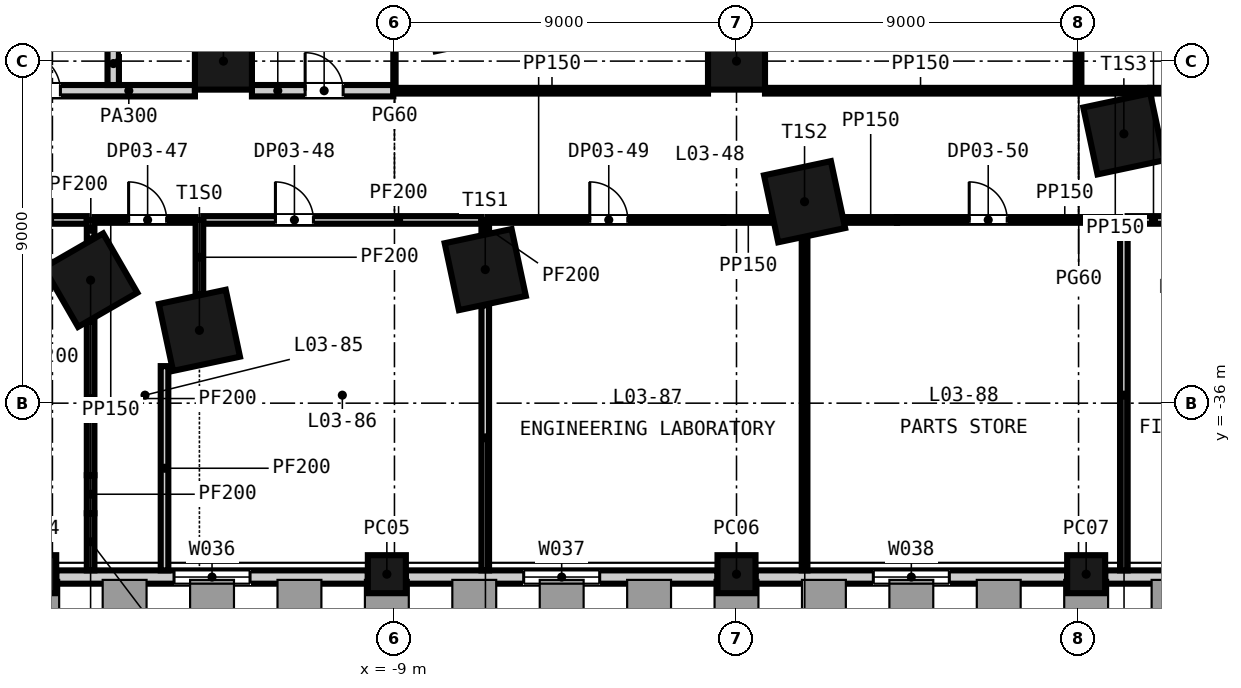
"""IFC4 building model, lengths in metres.
Left out: names, types, materials, properties, quantities, classifications, styles, units other than length and angle.
Written with IfcOpenShell. Run it as: python <this file> out.ifc"""

import sys

from ifc_helpers import new_model, si_unit, direction, frame, frame_2d, origin, origin_2d, place, context, subcontext, project, spatial, rectangle, extrude, element, fill, save


model = new_model("IFC4")
c1 = context("Model", 3, precision=1e-05, world=origin(), true_north=direction((0.0, 1.0)))
c2 = subcontext(c1, "Body", "Model", "MODEL_VIEW")
j1 = project(units=[si_unit("LENGTHUNIT", "METRE"), si_unit("PLANEANGLEUNIT", "RADIAN")], contexts=[c1])
p1 = place(None, origin())
s1 = spatial("IfcSite", under=j1, at=p1, CompositionType="ELEMENT")
p2 = place(p1, origin())
s2 = spatial("IfcBuilding", under=s1, at=p2, CompositionType="ELEMENT")
p3 = place(p2, frame((0.0, 0.0, 22.5)))
s3 = spatial("IfcBuildingStorey", under=s2, at=p3, CompositionType="ELEMENT", Elevation=22.5)
for number, where, z_axis, x_axis in (
    (1, (-16.995, -32.763, -0.3), (0.0, 0.0, 1.0), (0.5, -0.866, 0.0)),
    (2, (-14.132, -34.084, -0.3), (0.0, 0.0, 1.0), (0.978, 0.208, 0.0)),
    (3, (-6.611, -32.485, -0.3), (0.0, 0.0, 1.0), (0.978, 0.208, 0.0)),
    (4, (1.791, -30.699, -0.3), (0.0, 0.0, 1.0), (0.978, 0.208, 0.0)),
    (5, (10.192, -28.914, -0.3), (0.0, 0.0, 1.0), (0.978, 0.208, 0.0)),
):
    element("IfcColumn", number, at=place(p3, frame(where, z_axis=z_axis, x_axis=x_axis)), inside=s3, PredefinedType="COLUMN", context=c2, shape_type="SweptSolid", body=[
        extrude(rectangle(XDim=1.8, YDim=1.8, at=origin_2d()), origin(), (0.0, 0.0, 1.0), 4.5),
    ])
for number, where, z_axis, x_axis in (
    (6, (-13.5, -27.0, -0.3), (0.0, 0.0, 1.0), (1.0, 0.0, 0.0)),
    (7, (0.0, -27.0, -0.3), (0.0, 0.0, 1.0), (1.0, 0.0, 0.0)),
):
    element("IfcColumn", number, at=place(p3, frame(where, z_axis=z_axis, x_axis=x_axis)), inside=s3, PredefinedType="COLUMN", context=c2, shape_type="SweptSolid", body=[
        extrude(rectangle(XDim=1.5, YDim=1.5, at=origin_2d()), origin(), (0.0, 0.0, 1.0), 4.5),
    ])
for number, where, z_axis, x_axis in (
    (8, (-18.4, -40.5, -0.3), (0.0, 0.0, 1.0), (1.0, 0.0, 0.0)),
    (9, (-9.2, -40.5, -0.3), (0.0, 0.0, 1.0), (1.0, 0.0, 0.0)),
    (10, (0.0, -40.5, -0.3), (0.0, 0.0, 1.0), (1.0, 0.0, 0.0)),
    (11, (9.2, -40.5, -0.3), (0.0, 0.0, 1.0), (1.0, 0.0, 0.0)),
):
    element("IfcColumn", number, at=place(p3, frame(where, z_axis=z_axis, x_axis=x_axis)), inside=s3, PredefinedType="COLUMN", context=c2, shape_type="SweptSolid", body=[
        extrude(rectangle(XDim=1.0, YDim=1.0, at=origin_2d()), origin(), (0.0, 0.0, 1.0), 4.5),
    ])
p4 = place(p3, frame((-17.9, -40.575, -0.3), z_axis=(0.0, 0.0, 1.0), x_axis=(1.0, 0.0, 0.0)))
e12 = element("IfcWall", 12, at=p4, inside=s3, PredefinedType="SOLIDWALL", context=c2, shape_type="SweptSolid", body=[
    extrude(rectangle(XDim=8.2, YDim=0.35, at=frame_2d((4.1, 0.0))), origin(), (0.0, 0.0, 1.0), 3.6),
])
p5 = place(p4, frame((3.1, 0.0, 1.2)))
e13 = element("IfcOpeningElement", 13, at=p5, cuts=e12, PredefinedType="OPENING", context=c2, shape_type="SweptSolid", body=[
    extrude(rectangle(XDim=2.0, YDim=2.35, at=frame_2d((1.0, 1.175))), frame((0.0, 0.185, 0.0), z_axis=(0.0, -1.0, 0.0), x_axis=(1.0, 0.0, 0.0)), (0.0, 0.0, 1.0), 0.37),
])
p6 = place(p3, frame((-8.7, -40.575, -0.3), z_axis=(0.0, 0.0, 1.0), x_axis=(1.0, 0.0, 0.0)))
e14 = element("IfcWall", 14, at=p6, inside=s3, PredefinedType="SOLIDWALL", context=c2, shape_type="SweptSolid", body=[
    extrude(rectangle(XDim=8.2, YDim=0.35, at=frame_2d((4.1, 0.0))), origin(), (0.0, 0.0, 1.0), 3.6),
])
p7 = place(p6, frame((3.1, 0.0, 1.2)))
e15 = element("IfcOpeningElement", 15, at=p7, cuts=e14, PredefinedType="OPENING", context=c2, shape_type="SweptSolid", body=[
    extrude(rectangle(XDim=2.0, YDim=2.35, at=frame_2d((1.0, 1.175))), frame((0.0, 0.185, 0.0), z_axis=(0.0, -1.0, 0.0), x_axis=(1.0, 0.0, 0.0)), (0.0, 0.0, 1.0), 0.37),
])
p8 = place(p3, frame((0.5, -40.575, -0.3), z_axis=(0.0, 0.0, 1.0), x_axis=(1.0, 0.0, 0.0)))
e16 = element("IfcWall", 16, at=p8, inside=s3, PredefinedType="SOLIDWALL", context=c2, shape_type="SweptSolid", body=[
    extrude(rectangle(XDim=8.2, YDim=0.35, at=frame_2d((4.1, 0.0))), origin(), (0.0, 0.0, 1.0), 3.6),
])
p9 = place(p8, frame((3.1, 0.0, 1.2)))
e17 = element("IfcOpeningElement", 17, at=p9, cuts=e16, PredefinedType="OPENING", context=c2, shape_type="SweptSolid", body=[
    extrude(rectangle(XDim=2.0, YDim=2.35, at=frame_2d((1.0, 1.175))), frame((0.0, 0.185, 0.0), z_axis=(0.0, -1.0, 0.0), x_axis=(1.0, 0.0, 0.0)), (0.0, 0.0, 1.0), 0.37),
])
p10 = place(p3, frame((9.7, -40.575, -0.3), z_axis=(0.0, 0.0, 1.0), x_axis=(1.0, 0.0, 0.0)))
e18 = element("IfcWall", 18, at=p10, inside=s3, PredefinedType="SOLIDWALL", context=c2, shape_type="SweptSolid", body=[
    extrude(rectangle(XDim=8.2, YDim=0.35, at=frame_2d((4.1, 0.0))), origin(), (0.0, 0.0, 1.0), 3.6),
])
p11 = place(p10, frame((3.1, 0.0, 1.2)))
e19 = element("IfcOpeningElement", 19, at=p11, cuts=e18, PredefinedType="OPENING", context=c2, shape_type="SweptSolid", body=[
    extrude(rectangle(XDim=2.0, YDim=2.35, at=frame_2d((1.0, 1.175))), frame((0.0, 0.185, 0.0), z_axis=(0.0, -1.0, 0.0), x_axis=(1.0, 0.0, 0.0)), (0.0, 0.0, 1.0), 0.37),
])
p12 = place(p3, frame((-19.065, -31.179, 0.0), z_axis=(0.0, 0.0, 1.0), x_axis=(1.0, 0.0, 0.0)))
e20 = element("IfcWall", 20, at=p12, inside=s3, PredefinedType="PARTITIONING", context=c2, shape_type="SweptSolid", body=[
    extrude(rectangle(XDim=1.97, YDim=0.2, at=frame_2d((0.985, 0.0))), origin(), (0.0, 0.0, 1.0), 3.2),
])
p13 = place(p3, frame((-16.895, -31.179, 0.0), z_axis=(0.0, 0.0, 1.0), x_axis=(1.0, 0.0, 0.0)))
e21 = element("IfcWall", 21, at=p13, inside=s3, PredefinedType="PARTITIONING", context=c2, shape_type="SweptSolid", body=[
    extrude(rectangle(XDim=2.663, YDim=0.15, at=frame_2d((1.332, 0.0))), origin(), (0.0, 0.0, 1.0), 4.2),
])
p14 = place(p13, frame((0.9, 0.0, 0.0)))
e22 = element("IfcOpeningElement", 22, at=p14, cuts=e21, PredefinedType="OPENING", context=c2, shape_type="SweptSolid", body=[
    extrude(rectangle(XDim=1.0, YDim=2.1, at=frame_2d((0.5, 1.05))), frame((0.0, 0.085, 0.0), z_axis=(0.0, -1.0, 0.0), x_axis=(1.0, 0.0, 0.0)), (0.0, 0.0, 1.0), 0.17),
])
p15 = place(p3, frame((-14.032, -31.179, 0.0), z_axis=(0.0, 0.0, 1.0), x_axis=(1.0, 0.0, 0.0)))
e23 = element("IfcWall", 23, at=p15, inside=s3, PredefinedType="PARTITIONING", context=c2, shape_type="SweptSolid", body=[
    extrude(rectangle(XDim=7.321, YDim=0.2, at=frame_2d((3.661, 0.0))), origin(), (0.0, 0.0, 1.0), 4.2),
])
p16 = place(p15, frame((1.9, 0.0, 0.0)))
e24 = element("IfcOpeningElement", 24, at=p16, cuts=e23, PredefinedType="OPENING", context=c2, shape_type="SweptSolid", body=[
    extrude(rectangle(XDim=1.0, YDim=2.1, at=frame_2d((0.5, 1.05))), frame((0.0, 0.11, 0.0), z_axis=(0.0, -1.0, 0.0), x_axis=(1.0, 0.0, 0.0)), (0.0, 0.0, 1.0), 0.22),
])
p17 = place(p3, frame((-6.511, -31.179, 0.0), z_axis=(0.0, 0.0, 1.0), x_axis=(1.0, 0.0, 0.0)))
e25 = element("IfcWall", 25, at=p17, inside=s3, PredefinedType="PARTITIONING", context=c2, shape_type="SweptSolid", body=[
    extrude(rectangle(XDim=6.165, YDim=0.15, at=frame_2d((3.083, 0.0))), origin(), (0.0, 0.0, 1.0), 4.2),
])
p18 = place(p17, frame((2.65, 0.0, 0.0)))
e26 = element("IfcOpeningElement", 26, at=p18, cuts=e25, PredefinedType="OPENING", context=c2, shape_type="SweptSolid", body=[
    extrude(rectangle(XDim=1.0, YDim=2.1, at=frame_2d((0.5, 1.05))), frame((0.0, 0.085, 0.0), z_axis=(0.0, -1.0, 0.0), x_axis=(1.0, 0.0, 0.0)), (0.0, 0.0, 1.0), 0.17),
])
p19 = place(p3, frame((-0.346, -31.179, 0.0), z_axis=(0.0, 0.0, 1.0), x_axis=(1.0, 0.0, 0.0)))
e27 = element("IfcWall", 27, at=p19, inside=s3, PredefinedType="PARTITIONING", context=c2, shape_type="SweptSolid", body=[
    extrude(rectangle(XDim=1.302, YDim=0.15, at=frame_2d((0.651, 0.0))), origin(), (0.0, 0.0, 1.0), 3.2),
])
p20 = place(p3, frame((2.829, -31.179, 0.0), z_axis=(0.0, 0.0, 1.0), x_axis=(1.0, 0.0, 0.0)))
e28 = element("IfcWall", 28, at=p20, inside=s3, PredefinedType="PARTITIONING", context=c2, shape_type="SweptSolid", body=[
    extrude(rectangle(XDim=1.395, YDim=0.15, at=frame_2d((0.697, 0.0))), origin(), (0.0, 0.0, 1.0), 3.2),
])
p21 = place(p3, frame((4.223, -31.179, 0.0), z_axis=(0.0, 0.0, 1.0), x_axis=(1.0, 0.0, 0.0)))
e29 = element("IfcWall", 29, at=p21, inside=s3, PredefinedType="PARTITIONING", context=c2, shape_type="SweptSolid", body=[
    extrude(rectangle(XDim=5.869, YDim=0.15, at=frame_2d((2.935, 0.0))), origin(), (0.0, 0.0, 1.0), 4.2),
])
p22 = place(p21, frame((1.9, 0.0, 0.0)))
e30 = element("IfcOpeningElement", 30, at=p22, cuts=e29, PredefinedType="OPENING", context=c2, shape_type="SweptSolid", body=[
    extrude(rectangle(XDim=1.0, YDim=2.1, at=frame_2d((0.5, 1.05))), frame((0.0, 0.085, 0.0), z_axis=(0.0, -1.0, 0.0), x_axis=(1.0, 0.0, 0.0)), (0.0, 0.0, 1.0), 0.17),
])
p23 = place(p3, frame((10.292, -31.179, 0.0), z_axis=(0.0, 0.0, 1.0), x_axis=(1.0, 0.0, 0.0)))
e31 = element("IfcWall", 31, at=p23, inside=s3, PredefinedType="PARTITIONING", context=c2, shape_type="SweptSolid", body=[
    extrude(rectangle(XDim=3.77, YDim=0.2, at=frame_2d((1.885, 0.0))), origin(), (0.0, 0.0, 1.0), 4.2),
])
p24 = place(p23, frame((1.4, 0.0, 0.0)))
e32 = element("IfcOpeningElement", 32, at=p24, cuts=e31, PredefinedType="OPENING", context=c2, shape_type="SweptSolid", body=[
    extrude(rectangle(XDim=1.0, YDim=2.1, at=frame_2d((0.5, 1.05))), frame((0.0, 0.11, 0.0), z_axis=(0.0, -1.0, 0.0), x_axis=(1.0, 0.0, 0.0)), (0.0, 0.0, 1.0), 0.22),
])
p25 = place(p3, frame((-20.189, -27.779, 0.0), z_axis=(0.0, 0.0, 1.0), x_axis=(1.0, 0.0, 0.0)))
e33 = element("IfcWall", 33, at=p25, inside=s3, PredefinedType="PARTITIONING", context=c2, shape_type="SweptSolid", body=[
    extrude(rectangle(XDim=5.939, YDim=0.3, at=frame_2d((2.97, 0.0))), origin(), (0.0, 0.0, 1.0), 4.2),
])
p26 = place(p25, frame((1.4, 0.0, 0.0)))
e34 = element("IfcOpeningElement", 34, at=p26, cuts=e33, PredefinedType="OPENING", context=c2, shape_type="SweptSolid", body=[
    extrude(rectangle(XDim=1.0, YDim=2.1, at=frame_2d((0.5, 1.05))), frame((0.0, 0.16, 0.0), z_axis=(0.0, -1.0, 0.0), x_axis=(1.0, 0.0, 0.0)), (0.0, 0.0, 1.0), 0.32),
])
p27 = place(p3, frame((-12.75, -27.779, 0.0), z_axis=(0.0, 0.0, 1.0), x_axis=(1.0, 0.0, 0.0)))
e35 = element("IfcWall", 35, at=p27, inside=s3, PredefinedType="PARTITIONING", context=c2, shape_type="SweptSolid", body=[
    extrude(rectangle(XDim=3.72, YDim=0.3, at=frame_2d((1.86, 0.0))), origin(), (0.0, 0.0, 1.0), 4.2),
])
p28 = place(p27, frame((1.4, 0.0, 0.0)))
e36 = element("IfcOpeningElement", 36, at=p28, cuts=e35, PredefinedType="OPENING", context=c2, shape_type="SweptSolid", body=[
    extrude(rectangle(XDim=1.0, YDim=2.1, at=frame_2d((0.5, 1.05))), frame((0.0, 0.16, 0.0), z_axis=(0.0, -1.0, 0.0), x_axis=(1.0, 0.0, 0.0)), (0.0, 0.0, 1.0), 0.32),
])
p29 = place(p3, frame((-8.97, -27.779, 0.0), z_axis=(0.0, 0.0, 1.0), x_axis=(1.0, 0.0, 0.0)))
e37 = element("IfcWall", 37, at=p29, inside=s3, PredefinedType="PARTITIONING", context=c2, shape_type="SweptSolid", body=[
    extrude(rectangle(XDim=8.22, YDim=0.15, at=frame_2d((4.11, 0.0))), origin(), (0.0, 0.0, 1.0), 4.2),
])
p30 = place(p3, frame((0.75, -27.779, 0.0), z_axis=(0.0, 0.0, 1.0), x_axis=(1.0, 0.0, 0.0)))
e38 = element("IfcWall", 38, at=p30, inside=s3, PredefinedType="PARTITIONING", context=c2, shape_type="SweptSolid", body=[
    extrude(rectangle(XDim=8.175, YDim=0.15, at=frame_2d((4.087, 0.0))), origin(), (0.0, 0.0, 1.0), 4.2),
])
p31 = place(p3, frame((9.075, -27.779, 0.0), z_axis=(0.0, 0.0, 1.0), x_axis=(1.0, 0.0, 0.0)))
e39 = element("IfcWall", 39, at=p31, inside=s3, PredefinedType="PARTITIONING", context=c2, shape_type="SweptSolid", body=[
    extrude(rectangle(XDim=1.773, YDim=0.15, at=frame_2d((0.886, 0.0))), origin(), (0.0, 0.0, 1.0), 4.2),
])
p32 = place(p3, frame((10.887, -27.779, 0.0), z_axis=(0.0, 0.0, 1.0), x_axis=(1.0, 0.0, 0.0)))
e40 = element("IfcWall", 40, at=p32, inside=s3, PredefinedType="PARTITIONING", context=c2, shape_type="SweptSolid", body=[
    extrude(rectangle(XDim=4.762, YDim=0.15, at=frame_2d((2.381, 0.0))), origin(), (0.0, 0.0, 1.0), 4.2),
])
p33 = place(p32, frame((1.9, 0.0, 0.0)))
e41 = element("IfcOpeningElement", 41, at=p33, cuts=e40, PredefinedType="OPENING", context=c2, shape_type="SweptSolid", body=[
    extrude(rectangle(XDim=1.0, YDim=2.1, at=frame_2d((0.5, 1.05))), frame((0.0, 0.085, 0.0), z_axis=(0.0, -1.0, 0.0), x_axis=(1.0, 0.0, 0.0)), (0.0, 0.0, 1.0), 0.17),
])
p34 = place(p3, frame((-16.995, -40.4, 0.0), z_axis=(0.0, 0.0, 1.0), x_axis=(0.0, 1.0, 0.0)))
e42 = element("IfcWall", 42, at=p34, inside=s3, PredefinedType="PARTITIONING", context=c2, shape_type="SweptSolid", body=[
    extrude(rectangle(XDim=1.504, YDim=0.2, at=frame_2d((0.752, 0.0))), origin(), (0.0, 0.0, 1.0), 4.2),
])
p35 = place(p3, frame((-16.995, -38.896, 0.0), z_axis=(0.0, 0.0, 1.0), x_axis=(0.0, 1.0, 0.0)))
e43 = element("IfcWall", 43, at=p35, inside=s3, PredefinedType="PARTITIONING", context=c2, shape_type="SweptSolid", body=[
    extrude(rectangle(XDim=1.0, YDim=0.2, at=frame_2d((0.5, 0.0))), origin(), (0.0, 0.0, 1.0), 3.676),
])
p36 = place(p3, frame((-16.995, -37.896, 0.0), z_axis=(0.0, 0.0, 1.0), x_axis=(0.0, 1.0, 0.0)))
e44 = element("IfcWall", 44, at=p36, inside=s3, PredefinedType="PARTITIONING", context=c2, shape_type="SweptSolid", body=[
    extrude(rectangle(XDim=4.036, YDim=0.2, at=frame_2d((2.018, 0.0))), origin(), (0.0, 0.0, 1.0), 4.2),
])
p37 = place(p3, frame((-16.995, -31.666, 0.0), z_axis=(0.0, 0.0, 1.0), x_axis=(0.0, 1.0, 0.0)))
e45 = element("IfcWall", 45, at=p37, inside=s3, PredefinedType="PARTITIONING", context=c2, shape_type="SweptSolid", body=[
    extrude(rectangle(XDim=0.487, YDim=0.2, at=frame_2d((0.244, 0.0))), origin(), (0.0, 0.0, 1.0), 4.2),
])
p38 = place(p3, frame((-16.4, -27.629, 0.0), z_axis=(0.0, 0.0, 1.0), x_axis=(0.0, 1.0, 0.0)))
e46 = element("IfcWall", 46, at=p38, inside=s3, PredefinedType="PARTITIONING", context=c2, shape_type="SweptSolid", body=[
    extrude(rectangle(XDim=1.129, YDim=0.3, at=frame_2d((0.564, 0.0))), origin(), (0.0, 0.0, 1.0), 3.667),
])
p39 = place(p3, frame((-15.05, -40.4, 0.0), z_axis=(0.0, 0.0, 1.0), x_axis=(0.0, 1.0, 0.0)))
e47 = element("IfcWall", 47, at=p39, inside=s3, PredefinedType="PARTITIONING", context=c2, shape_type="SweptSolid", body=[
    extrude(rectangle(XDim=5.375, YDim=0.2, at=frame_2d((2.688, 0.0))), origin(), (0.0, 0.0, 1.0), 4.2),
])
p40 = place(p3, frame((-14.132, -33.142, 0.0), z_axis=(0.0, 0.0, 1.0), x_axis=(0.0, 1.0, 0.0)))
e48 = element("IfcWall", 48, at=p40, inside=s3, PredefinedType="PARTITIONING", context=c2, shape_type="SweptSolid", body=[
    extrude(rectangle(XDim=1.963, YDim=0.2, at=frame_2d((0.982, 0.0))), origin(), (0.0, 0.0, 1.0), 4.2),
])
p41 = place(p3, frame((-9.0, -27.778, 0.0), z_axis=(0.0, 0.0, 1.0), x_axis=(0.0, 1.0, 0.0)))
e49 = element("IfcWall", 49, at=p41, inside=s3, PredefinedType="PARTITIONING", context=c2, shape_type="SweptSolid", body=[
    extrude(rectangle(XDim=12.288, YDim=0.06, at=frame_2d((6.144, 0.0))), origin(), (0.0, 0.0, 1.0), 4.2),
])
p42 = place(p3, frame((-6.611, -40.4, 0.0), z_axis=(0.0, 0.0, 1.0), x_axis=(0.0, 1.0, 0.0)))
e50 = element("IfcWall", 50, at=p42, inside=s3, PredefinedType="PARTITIONING", context=c2, shape_type="SweptSolid", body=[
    extrude(rectangle(XDim=6.973, YDim=0.2, at=frame_2d((3.487, 0.0))), origin(), (0.0, 0.0, 1.0), 4.2),
])
p43 = place(p3, frame((-6.611, -31.544, 0.0), z_axis=(0.0, 0.0, 1.0), x_axis=(0.0, 1.0, 0.0)))
e51 = element("IfcWall", 51, at=p43, inside=s3, PredefinedType="PARTITIONING", context=c2, shape_type="SweptSolid", body=[
    extrude(rectangle(XDim=0.365, YDim=0.2, at=frame_2d((0.182, 0.0))), origin(), (0.0, 0.0, 1.0), 4.2),
])
p44 = place(p3, frame((1.791, -40.4, 0.0), z_axis=(0.0, 0.0, 1.0), x_axis=(0.0, 1.0, 0.0)))
e52 = element("IfcWall", 52, at=p44, inside=s3, PredefinedType="PARTITIONING", context=c2, shape_type="SweptSolid", body=[
    extrude(rectangle(XDim=8.765, YDim=0.15, at=frame_2d((4.382, 0.0))), origin(), (0.0, 0.0, 1.0), 4.2),
])
p45 = place(p3, frame((9.0, -27.778, 0.0), z_axis=(0.0, 0.0, 1.0), x_axis=(0.0, 1.0, 0.0)))
e53 = element("IfcWall", 53, at=p45, inside=s3, PredefinedType="PARTITIONING", context=c2, shape_type="SweptSolid", body=[
    extrude(rectangle(XDim=3.825, YDim=0.15, at=frame_2d((1.913, 0.0))), origin(), (0.0, 0.0, 1.0), 4.2),
])
p46 = place(p3, frame((10.192, -40.4, 0.0), z_axis=(0.0, 0.0, 1.0), x_axis=(0.0, 1.0, 0.0)))
e54 = element("IfcWall", 54, at=p46, inside=s3, PredefinedType="PARTITIONING", context=c2, shape_type="SweptSolid", body=[
    extrude(rectangle(XDim=9.221, YDim=0.2, at=frame_2d((4.61, 0.0))), origin(), (0.0, 0.0, 1.0), 4.2),
])
p47 = place(p5, origin())
e55 = element("IfcWindow", 55, at=p47, inside=s3, PartitioningType="SINGLE_PANEL", PredefinedType="WINDOW", context=c2, shape_type="SweptSolid", body=[
    extrude(rectangle(XDim=2.0, YDim=2.35, at=frame_2d((1.0, 1.175))), frame((0.0, 0.03, 0.0), z_axis=(0.0, -1.0, 0.0), x_axis=(1.0, 0.0, 0.0)), (0.0, 0.0, 1.0), 0.06),
])
fill(e13, e55)
p48 = place(p7, origin())
e56 = element("IfcWindow", 56, at=p48, inside=s3, PartitioningType="SINGLE_PANEL", PredefinedType="WINDOW", context=c2, shape_type="SweptSolid", body=[
    extrude(rectangle(XDim=2.0, YDim=2.35, at=frame_2d((1.0, 1.175))), frame((0.0, 0.03, 0.0), z_axis=(0.0, -1.0, 0.0), x_axis=(1.0, 0.0, 0.0)), (0.0, 0.0, 1.0), 0.06),
])
fill(e15, e56)
p49 = place(p9, origin())
e57 = element("IfcWindow", 57, at=p49, inside=s3, PartitioningType="SINGLE_PANEL", PredefinedType="WINDOW", context=c2, shape_type="SweptSolid", body=[
    extrude(rectangle(XDim=2.0, YDim=2.35, at=frame_2d((1.0, 1.175))), frame((0.0, 0.03, 0.0), z_axis=(0.0, -1.0, 0.0), x_axis=(1.0, 0.0, 0.0)), (0.0, 0.0, 1.0), 0.06),
])
fill(e17, e57)
p50 = place(p26, origin())
e58 = element("IfcDoor", 58, at=p50, inside=s3, OperationType="SINGLE_SWING_LEFT", PredefinedType="DOOR", context=c2, shape_type="SweptSolid", body=[
    extrude(rectangle(XDim=1.0, YDim=2.1, at=frame_2d((0.5, 1.05))), frame((0.0, 0.025, 0.0), z_axis=(0.0, -1.0, 0.0), x_axis=(1.0, 0.0, 0.0)), (0.0, 0.0, 1.0), 0.05),
])
fill(e34, e58)
p51 = place(p28, origin())
e59 = element("IfcDoor", 59, at=p51, inside=s3, OperationType="SINGLE_SWING_LEFT", PredefinedType="DOOR", context=c2, shape_type="SweptSolid", body=[
    extrude(rectangle(XDim=1.0, YDim=2.1, at=frame_2d((0.5, 1.05))), frame((0.0, 0.025, 0.0), z_axis=(0.0, -1.0, 0.0), x_axis=(1.0, 0.0, 0.0)), (0.0, 0.0, 1.0), 0.05),
])
fill(e36, e59)
p52 = place(p14, origin())
e60 = element("IfcDoor", 60, at=p52, inside=s3, OperationType="SINGLE_SWING_LEFT", PredefinedType="DOOR", context=c2, shape_type="SweptSolid", body=[
    extrude(rectangle(XDim=1.0, YDim=2.1, at=frame_2d((0.5, 1.05))), frame((0.0, 0.025, 0.0), z_axis=(0.0, -1.0, 0.0), x_axis=(1.0, 0.0, 0.0)), (0.0, 0.0, 1.0), 0.05),
])
fill(e22, e60)
p53 = place(p16, origin())
e61 = element("IfcDoor", 61, at=p53, inside=s3, OperationType="SINGLE_SWING_LEFT", PredefinedType="DOOR", context=c2, shape_type="SweptSolid", body=[
    extrude(rectangle(XDim=1.0, YDim=2.1, at=frame_2d((0.5, 1.05))), frame((0.0, 0.025, 0.0), z_axis=(0.0, -1.0, 0.0), x_axis=(1.0, 0.0, 0.0)), (0.0, 0.0, 1.0), 0.05),
])
fill(e24, e61)
p54 = place(p18, origin())
e62 = element("IfcDoor", 62, at=p54, inside=s3, OperationType="SINGLE_SWING_LEFT", PredefinedType="DOOR", context=c2, shape_type="SweptSolid", body=[
    extrude(rectangle(XDim=1.0, YDim=2.1, at=frame_2d((0.5, 1.05))), frame((0.0, 0.025, 0.0), z_axis=(0.0, -1.0, 0.0), x_axis=(1.0, 0.0, 0.0)), (0.0, 0.0, 1.0), 0.05),
])
fill(e26, e62)
p55 = place(p22, origin())
e63 = element("IfcDoor", 63, at=p55, inside=s3, OperationType="SINGLE_SWING_LEFT", PredefinedType="DOOR", context=c2, shape_type="SweptSolid", body=[
    extrude(rectangle(XDim=1.0, YDim=2.1, at=frame_2d((0.5, 1.05))), frame((0.0, 0.025, 0.0), z_axis=(0.0, -1.0, 0.0), x_axis=(1.0, 0.0, 0.0)), (0.0, 0.0, 1.0), 0.05),
])
fill(e30, e63)
save(model, sys.argv[1])
